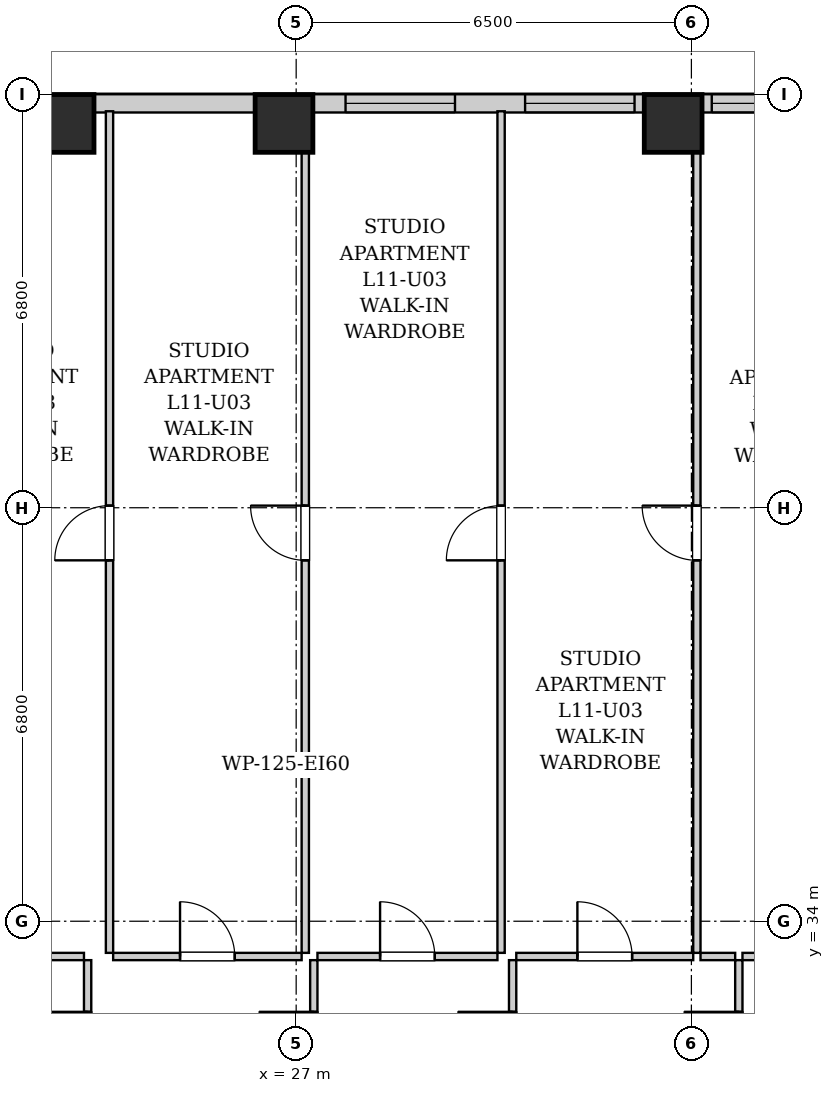
"""IFC4 building model, lengths in metres.
Left out: names, types, materials, properties, quantities, classifications, styles, units other than length and angle.
Written with IfcOpenShell. Run it as: python <this file> out.ifc"""

import sys

from ifc_helpers import new_model, si_unit, direction, frame, frame_2d, origin, origin_2d, place, context, subcontext, project, spatial, rectangle, extrude, element, fill, save


model = new_model("IFC4")
c1 = context("Model", 3, precision=1e-05, world=origin(), true_north=direction((0.0, 1.0)))
c2 = subcontext(c1, "Body", "Model", "MODEL_VIEW")
j1 = project(units=[si_unit("LENGTHUNIT", "METRE"), si_unit("PLANEANGLEUNIT", "RADIAN")], contexts=[c1])
p1 = place(None, origin())
s1 = spatial("IfcSite", under=j1, at=p1, CompositionType="ELEMENT")
p2 = place(p1, origin())
s2 = spatial("IfcBuilding", under=s1, at=p2, CompositionType="ELEMENT")
p3 = place(p2, frame((0.0, 0.0, 45.0)))
s3 = spatial("IfcBuildingStorey", under=s2, at=p3, CompositionType="ELEMENT", Elevation=45.0)
for number, where, z_axis, x_axis in (
    (1, (23.2, 47.12, 0.0), (0.0, 0.0, 1.0), (1.0, 0.0, 0.0)),
    (2, (26.8, 47.12, 0.0), (0.0, 0.0, 1.0), (1.0, 0.0, 0.0)),
    (3, (33.2, 47.12, 0.0), (0.0, 0.0, 1.0), (1.0, 0.0, 0.0)),
):
    element("IfcColumn", number, at=place(p3, frame(where, z_axis=z_axis, x_axis=x_axis)), inside=s3, PredefinedType="COLUMN", context=c2, shape_type="SweptSolid", body=[
        extrude(rectangle(XDim=0.95, YDim=0.95, at=origin_2d()), origin(), (0.0, 0.0, 1.0), 3.2),
    ])
p4 = place(p3, frame((10.0, 47.45, 0.0), z_axis=(0.0, 0.0, 1.0), x_axis=(1.0, 0.0, 0.0)))
e4 = element("IfcWall", 4, at=p4, inside=s3, PredefinedType="SOLIDWALL", context=c2, shape_type="SweptSolid", body=[
    extrude(rectangle(XDim=25.7, YDim=0.3, at=frame_2d((12.85, 0.0))), origin(), (0.0, 0.0, 1.0), 1.975),
])
p5 = place(p4, frame((1.73, 0.0, 0.55)))
e5 = element("IfcOpeningElement", 5, at=p5, cuts=e4, PredefinedType="OPENING", context=c2, shape_type="SweptSolid", body=[
    extrude(rectangle(XDim=1.8, YDim=1.2, at=frame_2d((0.9, 0.6))), frame((0.0, 0.16, 0.0), z_axis=(0.0, -1.0, 0.0), x_axis=(1.0, 0.0, 0.0)), (0.0, 0.0, 1.0), 0.32),
])
p6 = place(p4, frame((4.961, 0.0, 0.55)))
e6 = element("IfcOpeningElement", 6, at=p6, cuts=e4, PredefinedType="OPENING", context=c2, shape_type="SweptSolid", body=[
    extrude(rectangle(XDim=1.8, YDim=1.2, at=frame_2d((0.9, 0.6))), frame((0.0, 0.16, 0.0), z_axis=(0.0, -1.0, 0.0), x_axis=(1.0, 0.0, 0.0)), (0.0, 0.0, 1.0), 0.32),
])
p7 = place(p4, frame((8.435, 0.0, 0.55)))
e7 = element("IfcOpeningElement", 7, at=p7, cuts=e4, PredefinedType="OPENING", context=c2, shape_type="SweptSolid", body=[
    extrude(rectangle(XDim=1.8, YDim=1.2, at=frame_2d((0.9, 0.6))), frame((0.0, 0.16, 0.0), z_axis=(0.0, -1.0, 0.0), x_axis=(1.0, 0.0, 0.0)), (0.0, 0.0, 1.0), 0.32),
])
p8 = place(p4, frame((11.15, 0.0, 0.55)))
e8 = element("IfcOpeningElement", 8, at=p8, cuts=e4, PredefinedType="OPENING", context=c2, shape_type="SweptSolid", body=[
    extrude(rectangle(XDim=1.35, YDim=1.2, at=frame_2d((0.675, 0.6))), frame((0.0, 0.16, 0.0), z_axis=(0.0, -1.0, 0.0), x_axis=(1.0, 0.0, 0.0)), (0.0, 0.0, 1.0), 0.32),
])
p9 = place(p4, frame((17.812, 0.0, 0.55)))
e9 = element("IfcOpeningElement", 9, at=p9, cuts=e4, PredefinedType="OPENING", context=c2, shape_type="SweptSolid", body=[
    extrude(rectangle(XDim=1.8, YDim=1.2, at=frame_2d((0.9, 0.6))), frame((0.0, 0.16, 0.0), z_axis=(0.0, -1.0, 0.0), x_axis=(1.0, 0.0, 0.0)), (0.0, 0.0, 1.0), 0.32),
])
p10 = place(p4, frame((20.765, 0.0, 0.55)))
e10 = element("IfcOpeningElement", 10, at=p10, cuts=e4, PredefinedType="OPENING", context=c2, shape_type="SweptSolid", body=[
    extrude(rectangle(XDim=1.8, YDim=1.2, at=frame_2d((0.9, 0.6))), frame((0.0, 0.16, 0.0), z_axis=(0.0, -1.0, 0.0), x_axis=(1.0, 0.0, 0.0)), (0.0, 0.0, 1.0), 0.32),
])
p11 = place(p4, frame((23.835, 0.0, 0.55)))
e11 = element("IfcOpeningElement", 11, at=p11, cuts=e4, PredefinedType="OPENING", context=c2, shape_type="SweptSolid", body=[
    extrude(rectangle(XDim=1.35, YDim=1.2, at=frame_2d((0.675, 0.6))), frame((0.0, 0.16, 0.0), z_axis=(0.0, -1.0, 0.0), x_axis=(1.0, 0.0, 0.0)), (0.0, 0.0, 1.0), 0.32),
])
p12 = place(p3, frame((23.57, 30.76, 0.0), z_axis=(0.0, 0.0, 1.0), x_axis=(0.0, 1.0, 0.0)))
e12 = element("IfcWall", 12, at=p12, inside=s3, PredefinedType="PARTITIONING", context=c2, shape_type="SweptSolid", body=[
    extrude(rectangle(XDim=2.6, YDim=0.12, at=frame_2d((1.3, 0.0))), origin(), (0.0, 0.0, 1.0), 2.94),
])
p13 = place(p12, frame((0.85, 0.0, 0.0)))
e13 = element("IfcOpeningElement", 13, at=p13, cuts=e12, PredefinedType="OPENING", context=c2, shape_type="SweptSolid", body=[
    extrude(rectangle(XDim=0.9, YDim=2.05, at=frame_2d((0.45, 1.025))), frame((0.0, 0.07, 0.0), z_axis=(0.0, -1.0, 0.0), x_axis=(1.0, 0.0, 0.0)), (0.0, 0.0, 1.0), 0.14),
])
p14 = place(p3, frame((20.77, 33.42, 0.0), z_axis=(0.0, 0.0, 1.0), x_axis=(1.0, 0.0, 0.0)))
e14 = element("IfcWall", 14, at=p14, inside=s3, PredefinedType="PARTITIONING", context=c2, shape_type="SweptSolid", body=[
    extrude(rectangle(XDim=2.74, YDim=0.12, at=frame_2d((1.37, 0.0))), origin(), (0.0, 0.0, 1.0), 2.94),
])
p15 = place(p14, frame((0.92, 0.0, 0.0)))
e15 = element("IfcOpeningElement", 15, at=p15, cuts=e14, PredefinedType="OPENING", context=c2, shape_type="SweptSolid", body=[
    extrude(rectangle(XDim=0.9, YDim=2.05, at=frame_2d((0.45, 1.025))), frame((0.0, 0.07, 0.0), z_axis=(0.0, -1.0, 0.0), x_axis=(1.0, 0.0, 0.0)), (0.0, 0.0, 1.0), 0.14),
])
p16 = place(p3, frame((27.29, 30.76, 0.0), z_axis=(0.0, 0.0, 1.0), x_axis=(0.0, 1.0, 0.0)))
e16 = element("IfcWall", 16, at=p16, inside=s3, PredefinedType="PARTITIONING", context=c2, shape_type="SweptSolid", body=[
    extrude(rectangle(XDim=2.6, YDim=0.12, at=frame_2d((1.3, 0.0))), origin(), (0.0, 0.0, 1.0), 2.94),
])
p17 = place(p16, frame((0.85, 0.0, 0.0)))
e17 = element("IfcOpeningElement", 17, at=p17, cuts=e16, PredefinedType="OPENING", context=c2, shape_type="SweptSolid", body=[
    extrude(rectangle(XDim=0.9, YDim=2.05, at=frame_2d((0.45, 1.025))), frame((0.0, 0.07, 0.0), z_axis=(0.0, -1.0, 0.0), x_axis=(1.0, 0.0, 0.0)), (0.0, 0.0, 1.0), 0.14),
])
p18 = place(p3, frame((23.99, 33.42, 0.0), z_axis=(0.0, 0.0, 1.0), x_axis=(1.0, 0.0, 0.0)))
e18 = element("IfcWall", 18, at=p18, inside=s3, PredefinedType="PARTITIONING", context=c2, shape_type="SweptSolid", body=[
    extrude(rectangle(XDim=3.1, YDim=0.12, at=frame_2d((1.55, 0.0))), origin(), (0.0, 0.0, 1.0), 2.94),
])
p19 = place(p18, frame((1.1, 0.0, 0.0)))
e19 = element("IfcOpeningElement", 19, at=p19, cuts=e18, PredefinedType="OPENING", context=c2, shape_type="SweptSolid", body=[
    extrude(rectangle(XDim=0.9, YDim=2.05, at=frame_2d((0.45, 1.025))), frame((0.0, 0.07, 0.0), z_axis=(0.0, -1.0, 0.0), x_axis=(1.0, 0.0, 0.0)), (0.0, 0.0, 1.0), 0.14),
])
p20 = place(p3, frame((30.56, 30.76, 0.0), z_axis=(0.0, 0.0, 1.0), x_axis=(0.0, 1.0, 0.0)))
e20 = element("IfcWall", 20, at=p20, inside=s3, PredefinedType="PARTITIONING", context=c2, shape_type="SweptSolid", body=[
    extrude(rectangle(XDim=2.6, YDim=0.12, at=frame_2d((1.3, 0.0))), origin(), (0.0, 0.0, 1.0), 2.94),
])
p21 = place(p20, frame((0.85, 0.0, 0.0)))
e21 = element("IfcOpeningElement", 21, at=p21, cuts=e20, PredefinedType="OPENING", context=c2, shape_type="SweptSolid", body=[
    extrude(rectangle(XDim=0.9, YDim=2.05, at=frame_2d((0.45, 1.025))), frame((0.0, 0.07, 0.0), z_axis=(0.0, -1.0, 0.0), x_axis=(1.0, 0.0, 0.0)), (0.0, 0.0, 1.0), 0.14),
])
p22 = place(p3, frame((27.35, 33.42, 0.0), z_axis=(0.0, 0.0, 1.0), x_axis=(1.0, 0.0, 0.0)))
e22 = element("IfcWall", 22, at=p22, inside=s3, PredefinedType="PARTITIONING", context=c2, shape_type="SweptSolid", body=[
    extrude(rectangle(XDim=2.96, YDim=0.12, at=frame_2d((1.48, 0.0))), origin(), (0.0, 0.0, 1.0), 2.94),
])
p23 = place(p22, frame((1.03, 0.0, 0.0)))
e23 = element("IfcOpeningElement", 23, at=p23, cuts=e22, PredefinedType="OPENING", context=c2, shape_type="SweptSolid", body=[
    extrude(rectangle(XDim=0.9, YDim=2.05, at=frame_2d((0.45, 1.025))), frame((0.0, 0.07, 0.0), z_axis=(0.0, -1.0, 0.0), x_axis=(1.0, 0.0, 0.0)), (0.0, 0.0, 1.0), 0.14),
])
p24 = place(p3, frame((34.28, 30.76, 0.0), z_axis=(0.0, 0.0, 1.0), x_axis=(0.0, 1.0, 0.0)))
e24 = element("IfcWall", 24, at=p24, inside=s3, PredefinedType="PARTITIONING", context=c2, shape_type="SweptSolid", body=[
    extrude(rectangle(XDim=2.6, YDim=0.12, at=frame_2d((1.3, 0.0))), origin(), (0.0, 0.0, 1.0), 2.94),
])
p25 = place(p24, frame((0.85, 0.0, 0.0)))
e25 = element("IfcOpeningElement", 25, at=p25, cuts=e24, PredefinedType="OPENING", context=c2, shape_type="SweptSolid", body=[
    extrude(rectangle(XDim=0.9, YDim=2.05, at=frame_2d((0.45, 1.025))), frame((0.0, 0.07, 0.0), z_axis=(0.0, -1.0, 0.0), x_axis=(1.0, 0.0, 0.0)), (0.0, 0.0, 1.0), 0.14),
])
p26 = place(p3, frame((30.62, 33.42, 0.0), z_axis=(0.0, 0.0, 1.0), x_axis=(1.0, 0.0, 0.0)))
e26 = element("IfcWall", 26, at=p26, inside=s3, PredefinedType="PARTITIONING", context=c2, shape_type="SweptSolid", body=[
    extrude(rectangle(XDim=2.91, YDim=0.12, at=frame_2d((1.455, 0.0))), origin(), (0.0, 0.0, 1.0), 2.94),
])
p27 = place(p26, frame((1.005, 0.0, 0.0)))
e27 = element("IfcOpeningElement", 27, at=p27, cuts=e26, PredefinedType="OPENING", context=c2, shape_type="SweptSolid", body=[
    extrude(rectangle(XDim=0.9, YDim=2.05, at=frame_2d((0.45, 1.025))), frame((0.0, 0.07, 0.0), z_axis=(0.0, -1.0, 0.0), x_axis=(1.0, 0.0, 0.0)), (0.0, 0.0, 1.0), 0.14),
])
p28 = place(p3, frame((33.65, 33.42, 0.0), z_axis=(0.0, 0.0, 1.0), x_axis=(1.0, 0.0, 0.0)))
e28 = element("IfcWall", 28, at=p28, inside=s3, PredefinedType="PARTITIONING", context=c2, shape_type="SweptSolid", body=[
    extrude(rectangle(XDim=0.57, YDim=0.12, at=frame_2d((0.285, 0.0))), origin(), (0.0, 0.0, 1.0), 2.94),
])
p29 = place(p3, frame((34.34, 33.42, 0.0), z_axis=(0.0, 0.0, 1.0), x_axis=(1.0, 0.0, 0.0)))
e29 = element("IfcWall", 29, at=p29, inside=s3, PredefinedType="PARTITIONING", context=c2, shape_type="SweptSolid", body=[
    extrude(rectangle(XDim=2.41, YDim=0.12, at=frame_2d((1.205, 0.0))), origin(), (0.0, 0.0, 1.0), 2.94),
])
p30 = place(p29, frame((0.755, 0.0, 0.0)))
e30 = element("IfcOpeningElement", 30, at=p30, cuts=e29, PredefinedType="OPENING", context=c2, shape_type="SweptSolid", body=[
    extrude(rectangle(XDim=0.9, YDim=2.05, at=frame_2d((0.45, 1.025))), frame((0.0, 0.07, 0.0), z_axis=(0.0, -1.0, 0.0), x_axis=(1.0, 0.0, 0.0)), (0.0, 0.0, 1.0), 0.14),
])
p31 = place(p3, frame((23.93, 33.48, 0.0), z_axis=(0.0, 0.0, 1.0), x_axis=(0.0, 1.0, 0.0)))
e31 = element("IfcWall", 31, at=p31, inside=s3, PredefinedType="PARTITIONING", context=c2, shape_type="SweptSolid", body=[
    extrude(rectangle(XDim=13.84, YDim=0.12, at=frame_2d((6.92, 0.0))), origin(), (0.0, 0.0, 1.0), 2.94),
])
p32 = place(p31, frame((6.455, 0.0, 0.0)))
e32 = element("IfcOpeningElement", 32, at=p32, cuts=e31, PredefinedType="OPENING", context=c2, shape_type="SweptSolid", body=[
    extrude(rectangle(XDim=0.9, YDim=2.05, at=frame_2d((0.45, 1.025))), frame((0.0, 0.07, 0.0), z_axis=(0.0, -1.0, 0.0), x_axis=(1.0, 0.0, 0.0)), (0.0, 0.0, 1.0), 0.14),
])
p33 = place(p3, frame((27.15, 33.48, 0.0), z_axis=(0.0, 0.0, 1.0), x_axis=(0.0, 1.0, 0.0)))
e33 = element("IfcWall", 33, at=p33, inside=s3, PredefinedType="PARTITIONING", context=c2, shape_type="SweptSolid", body=[
    extrude(rectangle(XDim=13.84, YDim=0.12, at=frame_2d((6.92, 0.0))), origin(), (0.0, 0.0, 1.0), 2.94),
])
p34 = place(p33, frame((6.455, 0.0, 0.0)))
e34 = element("IfcOpeningElement", 34, at=p34, cuts=e33, PredefinedType="OPENING", context=c2, shape_type="SweptSolid", body=[
    extrude(rectangle(XDim=0.9, YDim=2.05, at=frame_2d((0.45, 1.025))), frame((0.0, 0.07, 0.0), z_axis=(0.0, -1.0, 0.0), x_axis=(1.0, 0.0, 0.0)), (0.0, 0.0, 1.0), 0.14),
])
p35 = place(p3, frame((30.37, 33.48, 0.0), z_axis=(0.0, 0.0, 1.0), x_axis=(0.0, 1.0, 0.0)))
e35 = element("IfcWall", 35, at=p35, inside=s3, PredefinedType="PARTITIONING", context=c2, shape_type="SweptSolid", body=[
    extrude(rectangle(XDim=13.84, YDim=0.12, at=frame_2d((6.92, 0.0))), origin(), (0.0, 0.0, 1.0), 2.94),
])
p36 = place(p35, frame((6.455, 0.0, 0.0)))
e36 = element("IfcOpeningElement", 36, at=p36, cuts=e35, PredefinedType="OPENING", context=c2, shape_type="SweptSolid", body=[
    extrude(rectangle(XDim=0.9, YDim=2.05, at=frame_2d((0.45, 1.025))), frame((0.0, 0.07, 0.0), z_axis=(0.0, -1.0, 0.0), x_axis=(1.0, 0.0, 0.0)), (0.0, 0.0, 1.0), 0.14),
])
p37 = place(p3, frame((33.59, 33.48, 0.0), z_axis=(0.0, 0.0, 1.0), x_axis=(0.0, 1.0, 0.0)))
e37 = element("IfcWall", 37, at=p37, inside=s3, PredefinedType="PARTITIONING", context=c2, shape_type="SweptSolid", body=[
    extrude(rectangle(XDim=13.84, YDim=0.12, at=frame_2d((6.92, 0.0))), origin(), (0.0, 0.0, 1.0), 2.94),
])
p38 = place(p37, frame((6.455, 0.0, 0.0)))
e38 = element("IfcOpeningElement", 38, at=p38, cuts=e37, PredefinedType="OPENING", context=c2, shape_type="SweptSolid", body=[
    extrude(rectangle(XDim=0.9, YDim=2.05, at=frame_2d((0.45, 1.025))), frame((0.0, 0.07, 0.0), z_axis=(0.0, -1.0, 0.0), x_axis=(1.0, 0.0, 0.0)), (0.0, 0.0, 1.0), 0.14),
])
p39 = place(p13, origin())
e39 = element("IfcDoor", 39, at=p39, inside=s3, OperationType="SINGLE_SWING_RIGHT", PredefinedType="DOOR", context=c2, shape_type="SweptSolid", body=[
    extrude(rectangle(XDim=0.9, YDim=2.05, at=frame_2d((0.45, 1.025))), frame((0.0, 0.025, 0.0), z_axis=(0.0, -1.0, 0.0), x_axis=(1.0, 0.0, 0.0)), (0.0, 0.0, 1.0), 0.05),
])
fill(e13, e39)
p40 = place(p17, origin())
e40 = element("IfcDoor", 40, at=p40, inside=s3, OperationType="SINGLE_SWING_RIGHT", PredefinedType="DOOR", context=c2, shape_type="SweptSolid", body=[
    extrude(rectangle(XDim=0.9, YDim=2.05, at=frame_2d((0.45, 1.025))), frame((0.0, 0.025, 0.0), z_axis=(0.0, -1.0, 0.0), x_axis=(1.0, 0.0, 0.0)), (0.0, 0.0, 1.0), 0.05),
])
fill(e17, e40)
p41 = place(p19, origin())
e41 = element("IfcDoor", 41, at=p41, inside=s3, OperationType="SINGLE_SWING_LEFT", PredefinedType="DOOR", context=c2, shape_type="SweptSolid", body=[
    extrude(rectangle(XDim=0.9, YDim=2.05, at=frame_2d((0.45, 1.025))), frame((0.0, 0.025, 0.0), z_axis=(0.0, -1.0, 0.0), x_axis=(1.0, 0.0, 0.0)), (0.0, 0.0, 1.0), 0.05),
])
fill(e19, e41)
p42 = place(p21, origin())
e42 = element("IfcDoor", 42, at=p42, inside=s3, OperationType="SINGLE_SWING_RIGHT", PredefinedType="DOOR", context=c2, shape_type="SweptSolid", body=[
    extrude(rectangle(XDim=0.9, YDim=2.05, at=frame_2d((0.45, 1.025))), frame((0.0, 0.025, 0.0), z_axis=(0.0, -1.0, 0.0), x_axis=(1.0, 0.0, 0.0)), (0.0, 0.0, 1.0), 0.05),
])
fill(e21, e42)
p43 = place(p23, origin())
e43 = element("IfcDoor", 43, at=p43, inside=s3, OperationType="SINGLE_SWING_LEFT", PredefinedType="DOOR", context=c2, shape_type="SweptSolid", body=[
    extrude(rectangle(XDim=0.9, YDim=2.05, at=frame_2d((0.45, 1.025))), frame((0.0, 0.025, 0.0), z_axis=(0.0, -1.0, 0.0), x_axis=(1.0, 0.0, 0.0)), (0.0, 0.0, 1.0), 0.05),
])
fill(e23, e43)
p44 = place(p25, origin())
e44 = element("IfcDoor", 44, at=p44, inside=s3, OperationType="SINGLE_SWING_RIGHT", PredefinedType="DOOR", context=c2, shape_type="SweptSolid", body=[
    extrude(rectangle(XDim=0.9, YDim=2.05, at=frame_2d((0.45, 1.025))), frame((0.0, 0.025, 0.0), z_axis=(0.0, -1.0, 0.0), x_axis=(1.0, 0.0, 0.0)), (0.0, 0.0, 1.0), 0.05),
])
fill(e25, e44)
p45 = place(p27, origin())
e45 = element("IfcDoor", 45, at=p45, inside=s3, OperationType="SINGLE_SWING_LEFT", PredefinedType="DOOR", context=c2, shape_type="SweptSolid", body=[
    extrude(rectangle(XDim=0.9, YDim=2.05, at=frame_2d((0.45, 1.025))), frame((0.0, 0.025, 0.0), z_axis=(0.0, -1.0, 0.0), x_axis=(1.0, 0.0, 0.0)), (0.0, 0.0, 1.0), 0.05),
])
fill(e27, e45)
p46 = place(p32, origin())
e46 = element("IfcDoor", 46, at=p46, inside=s3, OperationType="SINGLE_SWING_LEFT", PredefinedType="DOOR", context=c2, shape_type="SweptSolid", body=[
    extrude(rectangle(XDim=0.9, YDim=2.05, at=frame_2d((0.45, 1.025))), frame((0.0, 0.025, 0.0), z_axis=(0.0, -1.0, 0.0), x_axis=(1.0, 0.0, 0.0)), (0.0, 0.0, 1.0), 0.05),
])
fill(e32, e46)
p47 = place(p34, origin())
e47 = element("IfcDoor", 47, at=p47, inside=s3, OperationType="SINGLE_SWING_RIGHT", PredefinedType="DOOR", context=c2, shape_type="SweptSolid", body=[
    extrude(rectangle(XDim=0.9, YDim=2.05, at=frame_2d((0.45, 1.025))), frame((0.0, 0.025, 0.0), z_axis=(0.0, -1.0, 0.0), x_axis=(1.0, 0.0, 0.0)), (0.0, 0.0, 1.0), 0.05),
])
fill(e34, e47)
p48 = place(p36, origin())
e48 = element("IfcDoor", 48, at=p48, inside=s3, OperationType="SINGLE_SWING_LEFT", PredefinedType="DOOR", context=c2, shape_type="SweptSolid", body=[
    extrude(rectangle(XDim=0.9, YDim=2.05, at=frame_2d((0.45, 1.025))), frame((0.0, 0.025, 0.0), z_axis=(0.0, -1.0, 0.0), x_axis=(1.0, 0.0, 0.0)), (0.0, 0.0, 1.0), 0.05),
])
fill(e36, e48)
p49 = place(p38, origin())
e49 = element("IfcDoor", 49, at=p49, inside=s3, OperationType="SINGLE_SWING_RIGHT", PredefinedType="DOOR", context=c2, shape_type="SweptSolid", body=[
    extrude(rectangle(XDim=0.9, YDim=2.05, at=frame_2d((0.45, 1.025))), frame((0.0, 0.025, 0.0), z_axis=(0.0, -1.0, 0.0), x_axis=(1.0, 0.0, 0.0)), (0.0, 0.0, 1.0), 0.05),
])
fill(e38, e49)
p50 = place(p9, origin())
e50 = element("IfcWindow", 50, at=p50, inside=s3, PartitioningType="DOUBLE_PANEL_VERTICAL", PredefinedType="WINDOW", context=c2, shape_type="SweptSolid", body=[
    extrude(rectangle(XDim=1.8, YDim=1.2, at=frame_2d((0.9, 0.6))), frame((0.0, 0.03, 0.0), z_axis=(0.0, -1.0, 0.0), x_axis=(1.0, 0.0, 0.0)), (0.0, 0.0, 1.0), 0.06),
])
fill(e9, e50)
p51 = place(p10, origin())
e51 = element("IfcWindow", 51, at=p51, inside=s3, PartitioningType="DOUBLE_PANEL_VERTICAL", PredefinedType="WINDOW", context=c2, shape_type="SweptSolid", body=[
    extrude(rectangle(XDim=1.8, YDim=1.2, at=frame_2d((0.9, 0.6))), frame((0.0, 0.03, 0.0), z_axis=(0.0, -1.0, 0.0), x_axis=(1.0, 0.0, 0.0)), (0.0, 0.0, 1.0), 0.06),
])
fill(e10, e51)
p52 = place(p11, origin())
e52 = element("IfcWindow", 52, at=p52, inside=s3, PartitioningType="SINGLE_PANEL", PredefinedType="WINDOW", context=c2, shape_type="SweptSolid", body=[
    extrude(rectangle(XDim=1.35, YDim=1.2, at=frame_2d((0.675, 0.6))), frame((0.0, 0.03, 0.0), z_axis=(0.0, -1.0, 0.0), x_axis=(1.0, 0.0, 0.0)), (0.0, 0.0, 1.0), 0.06),
])
fill(e11, e52)
save(model, sys.argv[1])
